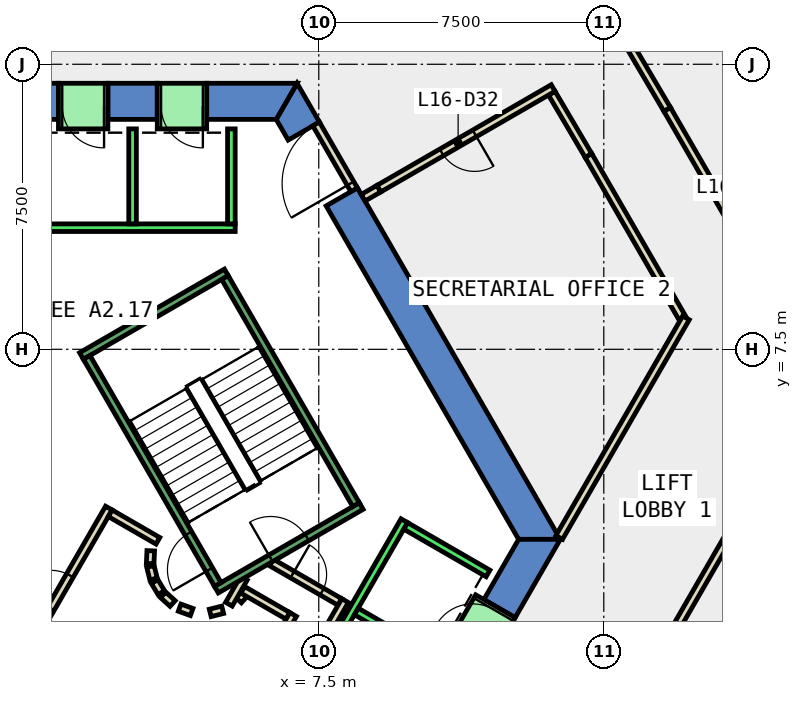
"""IFC4 building model, lengths in metres.
Left out: names, types, materials, properties, quantities, classifications, styles, units other than length and angle.
Written with IfcOpenShell. Run it as: python <this file> out.ifc"""

import sys

from ifc_helpers import new_model, si_unit, direction, frame, frame_2d, origin, place, context, subcontext, project, spatial, polyline, rectangle, outline, extrude, element, fill, save


model = new_model("IFC4")
c1 = context("Model", 3, precision=1e-05, world=origin(), true_north=direction((0.0, 1.0)))
c2 = subcontext(c1, "Body", "Model", "MODEL_VIEW")
j1 = project(units=[si_unit("LENGTHUNIT", "METRE"), si_unit("PLANEANGLEUNIT", "RADIAN")], contexts=[c1])
p1 = place(None, origin())
s1 = spatial("IfcSite", under=j1, at=p1, CompositionType="ELEMENT")
p2 = place(p1, origin())
s2 = spatial("IfcBuilding", under=s1, at=p2, CompositionType="ELEMENT")
p3 = place(p2, frame((0.0, 0.0, 77.0)))
s3 = spatial("IfcBuildingStorey", under=s2, at=p3, CompositionType="ELEMENT", Elevation=77.0)
p4 = place(p3, frame((0.0, 0.0, -0.4)))
e1 = element("IfcWall", 1, at=p4, inside=s3, PredefinedType="SHEAR", context=c2, shape_type="SweptSolid", body=[
    extrude(outline(polyline([(8.517, 11.748), (7.694, 11.273), (12.759, 2.5), (13.856, 2.5), (8.517, 11.748)])), origin(), (0.0, 0.0, 1.0), 4.0),
])
p5 = place(p3, frame((0.0, 0.0, -0.4)))
e2 = element("IfcWall", 2, at=p5, inside=s3, PredefinedType="SHEAR", context=c2, shape_type="SweptSolid", body=[
    extrude(outline(polyline([(6.695, 13.005), (7.517, 13.48), (6.928, 14.5), (6.38, 13.55), (6.695, 13.005)])), origin(), (0.0, 0.0, 1.0), 4.0),
])
p6 = place(p3, frame((0.0, 0.0, -0.4)))
e3 = element("IfcWall", 3, at=p6, inside=s3, PredefinedType="SHEAR", context=c2, shape_type="SweptSolid", body=[
    extrude(outline(polyline([(4.55, 14.5), (4.55, 13.55), (6.38, 13.55), (6.928, 14.5), (4.55, 14.5)])), origin(), (0.0, 0.0, 1.0), 4.0),
])
p7 = place(p3, frame((0.0, 0.0, -0.4)))
e4 = element("IfcWall", 4, at=p7, inside=s3, PredefinedType="SHEAR", context=c2, shape_type="SweptSolid", body=[
    extrude(outline(polyline([(1.95, 14.5), (1.95, 13.55), (3.25, 13.55), (3.25, 14.5), (1.95, 14.5)])), origin(), (0.0, 0.0, 1.0), 4.0),
])
p8 = place(p3, frame((0.0, 0.0, -0.4)))
e5 = element("IfcWall", 5, at=p8, inside=s3, PredefinedType="SHEAR", context=c2, shape_type="SweptSolid", body=[
    extrude(outline(polyline([(-0.65, 14.5), (-0.65, 13.55), (0.65, 13.55), (0.65, 14.5), (-0.65, 14.5)])), origin(), (0.0, 0.0, 1.0), 4.0),
])
p9 = place(p3, frame((0.0, 0.0, -0.4)))
e6 = element("IfcWall", 6, at=p9, inside=s3, PredefinedType="SHEAR", context=c2, shape_type="SweptSolid", body=[
    extrude(outline(polyline([(11.844, 0.915), (12.667, 0.44), (13.856, 2.5), (12.759, 2.5), (11.844, 0.915)])), origin(), (0.0, 0.0, 1.0), 4.0),
])
p10 = place(p3, frame((17.063, 8.328, 0.0), z_axis=(0.0, 0.0, 1.0), x_axis=(-0.499986575203, 0.866033154456, 0.0)))
e7 = element("IfcWall", 7, at=p10, inside=s3, PredefinedType="PARTITIONING", context=c2, shape_type="SweptSolid", body=[
    extrude(rectangle(XDim=4.934, YDim=0.2, at=frame_2d((2.467, 0.0))), origin(), (0.0, 0.0, 1.0), 3.6),
])
p11 = place(p3, frame((14.596, 12.601, 0.0), z_axis=(0.0, 0.0, 1.0), x_axis=(-0.507547610008, 0.861623713447, 0.0)))
e8 = element("IfcWall", 8, at=p11, inside=s3, PredefinedType="PARTITIONING", context=c2, shape_type="SweptSolid", body=[
    extrude(rectangle(XDim=1.901, YDim=0.2, at=frame_2d((0.95, 0.0))), origin(), (0.0, 0.0, 1.0), 3.6),
])
p12 = place(p3, frame((13.667, 14.375, 0.0), z_axis=(0.0, 0.0, 1.0), x_axis=(-0.866016748302, -0.500014991436, 0.0)))
e9 = element("IfcWall", 9, at=p12, inside=s3, PredefinedType="PARTITIONING", context=c2, shape_type="SweptSolid", body=[
    extrude(rectangle(XDim=5.298, YDim=0.2, at=frame_2d((2.649, 0.0))), origin(), (0.0, 0.0, 1.0), 3.6),
])
p13 = place(p12, frame((2.387, 0.0, 0.0)))
e10 = element("IfcOpeningElement", 10, at=p13, cuts=e9, PredefinedType="OPENING", context=c2, shape_type="SweptSolid", body=[
    extrude(rectangle(XDim=1.0, YDim=2.1, at=frame_2d((0.5, 1.05))), frame((0.0, 0.11, 0.0), z_axis=(0.0, -1.0, 0.0), x_axis=(1.0, 0.0, 0.0)), (0.0, 0.0, 1.0), 0.22),
])
p14 = place(p3, frame((14.865, 16.871, 0.0), z_axis=(0.0, 0.0, 1.0), x_axis=(0.507839876831, -0.861451484125, 0.0)))
e11 = element("IfcWall", 11, at=p14, inside=s3, PredefinedType="PARTITIONING", context=c2, shape_type="SweptSolid", body=[
    extrude(rectangle(XDim=3.552, YDim=0.2, at=frame_2d((1.776, 0.0))), origin(), (0.0, 0.0, 1.0), 3.6),
])
p15 = place(p3, frame((16.669, 13.811, 0.0), z_axis=(0.0, 0.0, 1.0), x_axis=(0.500027672765, -0.866009426316, 0.0)))
e12 = element("IfcWall", 12, at=p15, inside=s3, PredefinedType="PARTITIONING", context=c2, shape_type="SweptSolid", body=[
    extrude(rectangle(XDim=7.178, YDim=0.2, at=frame_2d((3.589, 0.0))), origin(), (0.0, 0.0, 1.0), 3.6),
])
p16 = place(p15, frame((3.164, 0.0, 0.0)))
e13 = element("IfcOpeningElement", 13, at=p16, cuts=e12, PredefinedType="OPENING", context=c2, shape_type="SweptSolid", body=[
    extrude(rectangle(XDim=1.0, YDim=2.1, at=frame_2d((0.5, 1.05))), frame((0.0, 0.11, 0.0), z_axis=(0.0, -1.0, 0.0), x_axis=(1.0, 0.0, 0.0)), (0.0, 0.0, 1.0), 0.22),
])
p17 = place(p3, frame((5.39, 0.898, 0.0), z_axis=(0.0, 0.0, 1.0), x_axis=(0.673828488714, 0.738887791073, 0.0)))
e14 = element("IfcWall", 14, at=p17, inside=s3, PredefinedType="PARTITIONING", context=c2, shape_type="SweptSolid", body=[
    extrude(rectangle(XDim=0.263, YDim=0.2, at=frame_2d((0.131, 0.0))), origin(), (0.0, 0.0, 1.0), 3.6),
])
p18 = place(p3, frame((5.499, 1.172, 0.0), z_axis=(0.0, 0.0, 1.0), x_axis=(0.866333505267, -0.499465972466, 0.0)))
e15 = element("IfcWall", 15, at=p18, inside=s3, PredefinedType="PARTITIONING", context=c2, shape_type="SweptSolid", body=[
    extrude(rectangle(XDim=1.374, YDim=0.2, at=frame_2d((0.687, 0.0))), origin(), (0.0, 0.0, 1.0), 3.6),
])
p19 = place(p3, frame((6.826, 0.522, 0.0), z_axis=(0.0, 0.0, 1.0), x_axis=(-0.500016722714, -0.866015748706, 0.0)))
e16 = element("IfcWall", 16, at=p19, inside=s3, PredefinedType="PARTITIONING", context=c2, shape_type="SweptSolid", body=[
    extrude(rectangle(XDim=1.7, YDim=0.2, at=frame_2d((0.85, 0.0))), origin(), (0.0, 0.0, 1.0), 3.6),
])
p20 = place(p3, frame((6.25, 1.894, 0.0), z_axis=(0.0, 0.0, 1.0), x_axis=(0.866043184279, -0.499969202016, 0.0)))
e17 = element("IfcWall", 17, at=p20, inside=s3, PredefinedType="PARTITIONING", context=c2, shape_type="SweptSolid", body=[
    extrude(rectangle(XDim=2.084, YDim=0.2, at=frame_2d((1.042, 0.0))), origin(), (0.0, 0.0, 1.0), 3.6),
])
p21 = place(p20, frame((0.642, 0.0, 0.0)))
e18 = element("IfcOpeningElement", 18, at=p21, cuts=e17, PredefinedType="OPENING", context=c2, shape_type="SweptSolid", body=[
    extrude(rectangle(XDim=0.9, YDim=2.1, at=frame_2d((0.45, 1.05))), frame((0.0, 0.11, 0.0), z_axis=(0.0, -1.0, 0.0), x_axis=(1.0, 0.0, 0.0)), (0.0, 0.0, 1.0), 0.22),
])
p22 = place(p3, frame((8.192, 0.888, 0.0), z_axis=(0.0, 0.0, 1.0), x_axis=(-0.499940625693, -0.866059680843, 0.0)))
e19 = element("IfcWall", 19, at=p22, inside=s3, PredefinedType="PARTITIONING", context=c2, shape_type="SweptSolid", body=[
    extrude(rectangle(XDim=2.68, YDim=0.2, at=frame_2d((1.34, 0.0))), origin(), (0.0, 0.0, 1.0), 3.6),
])
p23 = place(p3, frame((5.135, 0.793, 0.0), z_axis=(0.0, 0.0, 1.0), x_axis=(0.499526442893, 0.866298639529, 0.0)))
e20 = element("IfcWall", 20, at=p23, inside=s3, PredefinedType="PARTITIONING", context=c2, shape_type="SweptSolid", body=[
    extrude(rectangle(XDim=0.791, YDim=0.2, at=frame_2d((0.396, 0.0))), origin(), (0.0, 0.0, 1.0), 3.6),
])
p24 = place(p3, frame((13.827, 2.55, 0.0), z_axis=(0.0, 0.0, 1.0), x_axis=(0.500039204794, 0.866002767703, 0.0)))
e21 = element("IfcWall", 21, at=p24, inside=s3, PredefinedType="PARTITIONING", context=c2, shape_type="SweptSolid", body=[
    extrude(rectangle(XDim=6.672, YDim=0.2, at=frame_2d((3.336, 0.0))), origin(), (0.0, 0.0, 1.0), 3.6),
])
p25 = place(p3, frame((-0.52, -1.0, 0.0), z_axis=(0.0, 0.0, 1.0), x_axis=(0.50011622646, 0.865958290007, 0.0)))
e22 = element("IfcWall", 22, at=p25, inside=s3, PredefinedType="PARTITIONING", context=c2, shape_type="SweptSolid", body=[
    extrude(rectangle(XDim=4.991, YDim=0.2, at=frame_2d((2.496, 0.0))), origin(), (0.0, 0.0, 1.0), 3.6),
])
p26 = place(p25, frame((1.945, 0.0, 0.0)))
e23 = element("IfcOpeningElement", 23, at=p26, cuts=e22, PredefinedType="OPENING", context=c2, shape_type="SweptSolid", body=[
    extrude(rectangle(XDim=1.0, YDim=2.1, at=frame_2d((0.5, 1.05))), frame((0.0, 0.11, 0.0), z_axis=(0.0, -1.0, 0.0), x_axis=(1.0, 0.0, 0.0)), (0.0, 0.0, 1.0), 0.22),
])
p27 = place(p3, frame((2.012, 3.186, 0.0), z_axis=(0.0, 0.0, 1.0), x_axis=(0.865891012941, -0.500232699559, 0.0)))
e24 = element("IfcWall", 24, at=p27, inside=s3, PredefinedType="PARTITIONING", context=c2, shape_type="SweptSolid", body=[
    extrude(rectangle(XDim=1.449, YDim=0.2, at=frame_2d((0.725, 0.0))), origin(), (0.0, 0.0, 1.0), 3.6),
])
p28 = place(p3, frame((3.079, 2.199, 0.0), z_axis=(0.0, 0.0, 1.0), x_axis=(-0.047771483479, -0.998858290933, 0.0)))
e25 = element("IfcWall", 25, at=p28, inside=s3, PredefinedType="PARTITIONING", context=c2, shape_type="SweptSolid", body=[
    extrude(rectangle(XDim=0.337, YDim=0.2, at=frame_2d((0.169, 0.0))), origin(), (0.0, 0.0, 1.0), 3.6),
])
p29 = place(p3, frame((3.07, 1.786, 0.0), z_axis=(0.0, 0.0, 1.0), x_axis=(0.242705583207, -0.970099994784, 0.0)))
e26 = element("IfcWall", 26, at=p29, inside=s3, PredefinedType="PARTITIONING", context=c2, shape_type="SweptSolid", body=[
    extrude(rectangle(XDim=0.338, YDim=0.2, at=frame_2d((0.169, 0.0))), origin(), (0.0, 0.0, 1.0), 3.6),
])
for number, where, z_axis, x_axis in (
    (27, (3.182, 1.388, 0.0), (0.0, 0.0, 1.0), (0.512, -0.859, 0.0)),
    (28, (3.404, 1.039, 0.0), (0.0, 0.0, 1.0), (0.74, -0.672, 0.0)),
):
    element("IfcWall", number, at=place(p3, frame(where, z_axis=z_axis, x_axis=x_axis)), inside=s3, PredefinedType="PARTITIONING", context=c2, shape_type="SweptSolid", body=[
        extrude(rectangle(XDim=0.338, YDim=0.2, at=frame_2d((0.169, 0.0))), origin(), (0.0, 0.0, 1.0), 3.6),
    ])
p30 = place(p3, frame((3.838, 0.702, 0.0), z_axis=(0.0, 0.0, 1.0), x_axis=(0.941035081519, -0.338308993895, 0.0)))
e29 = element("IfcWall", 29, at=p30, inside=s3, PredefinedType="PARTITIONING", context=c2, shape_type="SweptSolid", body=[
    extrude(rectangle(XDim=0.337, YDim=0.2, at=frame_2d((0.168, 0.0))), origin(), (0.0, 0.0, 1.0), 3.6),
])
p31 = place(p3, frame((4.644, 0.564, 0.0), z_axis=(0.0, 0.0, 1.0), x_axis=(0.969929076366, 0.243387729394, 0.0)))
e30 = element("IfcWall", 30, at=p31, inside=s3, PredefinedType="PARTITIONING", context=c2, shape_type="SweptSolid", body=[
    extrude(rectangle(XDim=0.337, YDim=0.2, at=frame_2d((0.168, 0.0))), origin(), (0.0, 0.0, 1.0), 3.6),
])
p32 = place(p3, frame((19.374, 4.458, 0.0), z_axis=(0.0, 0.0, 1.0), x_axis=(-0.499973880856, -0.866040483154, 0.0)))
e31 = element("IfcWall", 31, at=p32, inside=s3, PredefinedType="PARTITIONING", context=c2, shape_type="SweptSolid", body=[
    extrude(rectangle(XDim=13.113, YDim=0.2, at=frame_2d((6.556, 0.0))), origin(), (0.0, 0.0, 1.0), 3.6),
])
p33 = place(p3, frame((8.43, 11.698, 0.0), z_axis=(0.0, 0.0, 1.0), x_axis=(-0.50002537861, 0.866010750942, 0.0)))
e32 = element("IfcWall", 32, at=p33, inside=s3, PredefinedType="PARTITIONING", context=c2, shape_type="SweptSolid", body=[
    extrude(rectangle(XDim=2.0, YDim=0.2, at=frame_2d((1.0, 0.0))), origin(), (0.0, 0.0, 1.0), 2.4),
])
p34 = place(p33, frame((0.19, 0.0, 0.0)))
e33 = element("IfcOpeningElement", 33, at=p34, cuts=e32, PredefinedType="OPENING", context=c2, shape_type="SweptSolid", body=[
    extrude(rectangle(XDim=1.8, YDim=2.1, at=frame_2d((0.9, 1.05))), frame((0.0, 0.11, 0.0), z_axis=(0.0, -1.0, 0.0), x_axis=(1.0, 0.0, 0.0)), (0.0, 0.0, 1.0), 0.22),
])
p35 = place(p3, frame((9.079, 11.726, 0.0), z_axis=(0.0, 0.0, 1.0), x_axis=(-0.865929261247, -0.500166486798, 0.0)))
e34 = element("IfcWall", 34, at=p35, inside=s3, PredefinedType="PARTITIONING", context=c2, shape_type="SweptSolid", body=[
    extrude(rectangle(XDim=0.476, YDim=0.2, at=frame_2d((0.238, 0.0))), origin(), (0.0, 0.0, 1.0), 2.4),
])
p36 = place(p3, frame((5.3, 10.7, 0.0), z_axis=(0.0, 0.0, 1.0), x_axis=(-1.0, 0.0, 0.0)))
e35 = element("IfcWall", 35, at=p36, inside=s3, PredefinedType="STANDARD", context=c2, shape_type="SweptSolid", body=[
    extrude(rectangle(XDim=10.6, YDim=0.2, at=frame_2d((5.3, 0.0))), origin(), (0.0, 0.0, 1.0), 3.6),
])
for number, where, z_axis, x_axis in (
    (36, (5.2, 10.8, 0.0), (0.0, 0.0, 1.0), (0.0, 1.0, 0.0)),
    (37, (2.6, 10.8, 0.0), (0.0, 0.0, 1.0), (0.0, 1.0, 0.0)),
):
    element("IfcWall", number, at=place(p3, frame(where, z_axis=z_axis, x_axis=x_axis)), inside=s3, PredefinedType="STANDARD", context=c2, shape_type="SweptSolid", body=[
        extrude(rectangle(XDim=2.5, YDim=0.2, at=frame_2d((1.25, 0.0))), origin(), (0.0, 0.0, 1.0), 3.6),
    ])
p37 = place(p3, frame((4.451, -6.19, 0.0), z_axis=(0.0, 0.0, 1.0), x_axis=(0.50000090737, 0.866024879913, 0.0)))
e38 = element("IfcWall", 38, at=p37, inside=s3, PredefinedType="STANDARD", context=c2, shape_type="SweptSolid", body=[
    extrude(rectangle(XDim=10.6, YDim=0.2, at=frame_2d((5.3, 0.0))), origin(), (0.0, 0.0, 1.0), 3.6),
])
p38 = place(p3, frame((8.488, 0.602, 0.0), z_axis=(0.0, 0.0, 1.0), x_axis=(0.866022959057, -0.500004234368, 0.0)))
e39 = element("IfcWall", 39, at=p38, inside=s3, PredefinedType="STANDARD", context=c2, shape_type="SweptSolid", body=[
    extrude(rectangle(XDim=2.5, YDim=0.2, at=frame_2d((1.25, 0.0))), origin(), (0.0, 0.0, 1.0), 3.6),
])
p39 = place(p3, frame((9.788, 2.853, 0.0), z_axis=(0.0, 0.0, 1.0), x_axis=(0.865998541277, -0.500046524342, 0.0)))
e40 = element("IfcWall", 40, at=p39, inside=s3, PredefinedType="STANDARD", context=c2, shape_type="SweptSolid", body=[
    extrude(rectangle(XDim=2.5, YDim=0.2, at=frame_2d((1.25, 0.0))), origin(), (0.0, 0.0, 1.0), 3.6),
])
p40 = place(p3, frame((4.55, 13.9, 0.0), z_axis=(0.0, 0.0, 1.0), x_axis=(-1.0, 0.0, 0.0)))
e41 = element("IfcWall", 41, at=p40, inside=s3, PredefinedType="STANDARD", context=c2, shape_type="SweptSolid", body=[
    extrude(rectangle(XDim=1.3, YDim=1.2, at=frame_2d((0.65, 0.0))), origin(), (0.0, 0.0, 1.0), 2.4),
])
p41 = place(p40, frame((0.1, 0.0, 0.0)))
e42 = element("IfcOpeningElement", 42, at=p41, cuts=e41, PredefinedType="OPENING", context=c2, shape_type="SweptSolid", body=[
    extrude(rectangle(XDim=1.1, YDim=2.3, at=frame_2d((0.55, 1.15))), frame((0.0, 0.61, 0.0), z_axis=(0.0, -1.0, 0.0), x_axis=(1.0, 0.0, 0.0)), (0.0, 0.0, 1.0), 1.22),
])
p42 = place(p3, frame((1.95, 13.9, 0.0), z_axis=(0.0, 0.0, 1.0), x_axis=(-1.0, 0.0, 0.0)))
e43 = element("IfcWall", 43, at=p42, inside=s3, PredefinedType="STANDARD", context=c2, shape_type="SweptSolid", body=[
    extrude(rectangle(XDim=1.3, YDim=1.2, at=frame_2d((0.65, 0.0))), origin(), (0.0, 0.0, 1.0), 2.4),
])
p43 = place(p42, frame((0.1, 0.0, 0.0)))
e44 = element("IfcOpeningElement", 44, at=p43, cuts=e43, PredefinedType="OPENING", context=c2, shape_type="SweptSolid", body=[
    extrude(rectangle(XDim=1.1, YDim=2.3, at=frame_2d((0.55, 1.15))), frame((0.0, 0.61, 0.0), z_axis=(0.0, -1.0, 0.0), x_axis=(1.0, 0.0, 0.0)), (0.0, 0.0, 1.0), 1.22),
])
p44 = place(p3, frame((11.498, -0.385, 0.0), z_axis=(0.0, 0.0, 1.0), x_axis=(0.500221244143, 0.865897630733, 0.0)))
e45 = element("IfcWall", 45, at=p44, inside=s3, PredefinedType="STANDARD", context=c2, shape_type="SweptSolid", body=[
    extrude(rectangle(XDim=1.299, YDim=1.2, at=frame_2d((0.65, 0.0))), origin(), (0.0, 0.0, 1.0), 2.4),
])
p45 = place(p44, frame((0.1, 0.0, 0.0)))
e46 = element("IfcOpeningElement", 46, at=p45, cuts=e45, PredefinedType="OPENING", context=c2, shape_type="SweptSolid", body=[
    extrude(rectangle(XDim=1.1, YDim=2.3, at=frame_2d((0.55, 1.15))), frame((0.0, 0.61, 0.0), z_axis=(0.0, -1.0, 0.0), x_axis=(1.0, 0.0, 0.0)), (0.0, 0.0, 1.0), 1.22),
])
p46 = place(p3, frame((4.806, 1.176, 0.0), z_axis=(0.0, 0.0, 1.0), x_axis=(0.866059941101, 0.499940174841, 0.0)))
e47 = element("IfcWall", 47, at=p46, inside=s3, PredefinedType="STANDARD", context=c2, shape_type="SweptSolid", body=[
    extrude(rectangle(XDim=4.4, YDim=0.2, at=frame_2d((2.2, 0.0))), origin(), (0.0, 0.0, 1.0), 3.6),
])
p47 = place(p46, frame((1.65, 0.0, 0.0)))
e48 = element("IfcOpeningElement", 48, at=p47, cuts=e47, PredefinedType="OPENING", context=c2, shape_type="SweptSolid", body=[
    extrude(rectangle(XDim=1.1, YDim=2.2, at=frame_2d((0.55, 1.1))), frame((0.0, 0.11, 0.0), z_axis=(0.0, -1.0, 0.0), x_axis=(1.0, 0.0, 0.0)), (0.0, 0.0, 1.0), 0.22),
])
p48 = place(p3, frame((1.256, 7.324, 0.0), z_axis=(0.0, 0.0, 1.0), x_axis=(0.866046073146, 0.499964197906, 0.0)))
e49 = element("IfcWall", 49, at=p48, inside=s3, PredefinedType="STANDARD", context=c2, shape_type="SweptSolid", body=[
    extrude(rectangle(XDim=4.4, YDim=0.2, at=frame_2d((2.2, 0.0))), origin(), (0.0, 0.0, 1.0), 3.6),
])
p49 = place(p3, frame((4.843, 1.312, 0.0), z_axis=(0.0, 0.0, 1.0), x_axis=(-0.499963383562, 0.866046543262, 0.0)))
e50 = element("IfcWall", 50, at=p49, inside=s3, PredefinedType="STANDARD", context=c2, shape_type="SweptSolid", body=[
    extrude(rectangle(XDim=6.9, YDim=0.2, at=frame_2d((3.45, 0.0))), origin(), (0.0, 0.0, 1.0), 3.6),
])
p50 = place(p49, frame((0.45, 0.0, 0.0)))
e51 = element("IfcOpeningElement", 51, at=p50, cuts=e50, PredefinedType="OPENING", context=c2, shape_type="SweptSolid", body=[
    extrude(rectangle(XDim=1.1, YDim=2.2, at=frame_2d((0.55, 1.1))), frame((0.0, 0.11, 0.0), z_axis=(0.0, -1.0, 0.0), x_axis=(1.0, 0.0, 0.0)), (0.0, 0.0, 1.0), 0.22),
])
p51 = place(p3, frame((8.48, 3.412, 0.0), z_axis=(0.0, 0.0, 1.0), x_axis=(-0.499978703459, 0.866037698999, 0.0)))
e52 = element("IfcWall", 52, at=p51, inside=s3, PredefinedType="STANDARD", context=c2, shape_type="SweptSolid", body=[
    extrude(rectangle(XDim=6.9, YDim=0.2, at=frame_2d((3.45, 0.0))), origin(), (0.0, 0.0, 1.0), 3.6),
])
p52 = place(p13, origin())
e53 = element("IfcDoor", 53, at=p52, inside=s3, OperationType="SINGLE_SWING_LEFT", PredefinedType="DOOR", context=c2, shape_type="SweptSolid", body=[
    extrude(rectangle(XDim=1.0, YDim=2.1, at=frame_2d((0.5, 1.05))), frame((0.0, 0.025, 0.0), z_axis=(0.0, -1.0, 0.0), x_axis=(1.0, 0.0, 0.0)), (0.0, 0.0, 1.0), 0.05),
])
fill(e10, e53)
p53 = place(p26, origin())
e54 = element("IfcDoor", 54, at=p53, inside=s3, OperationType="SINGLE_SWING_LEFT", PredefinedType="DOOR", context=c2, shape_type="SweptSolid", body=[
    extrude(rectangle(XDim=1.0, YDim=2.1, at=frame_2d((0.5, 1.05))), frame((0.0, 0.025, 0.0), z_axis=(0.0, -1.0, 0.0), x_axis=(1.0, 0.0, 0.0)), (0.0, 0.0, 1.0), 0.05),
])
fill(e23, e54)
p54 = place(p21, origin())
e55 = element("IfcDoor", 55, at=p54, inside=s3, OperationType="SINGLE_SWING_LEFT", PredefinedType="DOOR", context=c2, shape_type="SweptSolid", body=[
    extrude(rectangle(XDim=0.9, YDim=2.1, at=frame_2d((0.45, 1.05))), frame((0.0, 0.025, 0.0), z_axis=(0.0, -1.0, 0.0), x_axis=(1.0, 0.0, 0.0)), (0.0, 0.0, 1.0), 0.05),
])
fill(e18, e55)
p55 = place(p34, origin())
e56 = element("IfcDoor", 56, at=p55, inside=s3, OperationType="DOUBLE_DOOR_SINGLE_SWING", PredefinedType="DOOR", context=c2, shape_type="SweptSolid", body=[
    extrude(rectangle(XDim=1.8, YDim=2.1, at=frame_2d((0.9, 1.05))), frame((0.0, 0.025, 0.0), z_axis=(0.0, -1.0, 0.0), x_axis=(1.0, 0.0, 0.0)), (0.0, 0.0, 1.0), 0.05),
])
fill(e33, e56)
p56 = place(p41, origin())
e57 = element("IfcDoor", 57, at=p56, inside=s3, OperationType="SLIDING_TO_LEFT", PredefinedType="DOOR", context=c2, shape_type="SweptSolid", body=[
    extrude(rectangle(XDim=1.1, YDim=2.3, at=frame_2d((0.55, 1.15))), frame((0.0, 0.025, 0.0), z_axis=(0.0, -1.0, 0.0), x_axis=(1.0, 0.0, 0.0)), (0.0, 0.0, 1.0), 0.05),
])
fill(e42, e57)
p57 = place(p43, origin())
e58 = element("IfcDoor", 58, at=p57, inside=s3, OperationType="SLIDING_TO_LEFT", PredefinedType="DOOR", context=c2, shape_type="SweptSolid", body=[
    extrude(rectangle(XDim=1.1, YDim=2.3, at=frame_2d((0.55, 1.15))), frame((0.0, 0.025, 0.0), z_axis=(0.0, -1.0, 0.0), x_axis=(1.0, 0.0, 0.0)), (0.0, 0.0, 1.0), 0.05),
])
fill(e44, e58)
p58 = place(p45, origin())
e59 = element("IfcDoor", 59, at=p58, inside=s3, OperationType="SLIDING_TO_LEFT", PredefinedType="DOOR", context=c2, shape_type="SweptSolid", body=[
    extrude(rectangle(XDim=1.1, YDim=2.3, at=frame_2d((0.55, 1.15))), frame((0.0, 0.025, 0.0), z_axis=(0.0, -1.0, 0.0), x_axis=(1.0, 0.0, 0.0)), (0.0, 0.0, 1.0), 0.05),
])
fill(e46, e59)
p59 = place(p50, origin())
e60 = element("IfcDoor", 60, at=p59, inside=s3, OperationType="SINGLE_SWING_LEFT", PredefinedType="DOOR", context=c2, shape_type="SweptSolid", body=[
    extrude(rectangle(XDim=1.1, YDim=2.2, at=frame_2d((0.55, 1.1))), frame((0.0, 0.025, 0.0), z_axis=(0.0, -1.0, 0.0), x_axis=(1.0, 0.0, 0.0)), (0.0, 0.0, 1.0), 0.05),
])
fill(e51, e60)
p60 = place(p47, origin())
e61 = element("IfcDoor", 61, at=p60, inside=s3, OperationType="SINGLE_SWING_LEFT", PredefinedType="DOOR", context=c2, shape_type="SweptSolid", body=[
    extrude(rectangle(XDim=1.1, YDim=2.2, at=frame_2d((0.55, 1.1))), frame((0.0, 0.025, 0.0), z_axis=(0.0, -1.0, 0.0), x_axis=(1.0, 0.0, 0.0)), (0.0, 0.0, 1.0), 0.05),
])
fill(e48, e61)
save(model, sys.argv[1])
